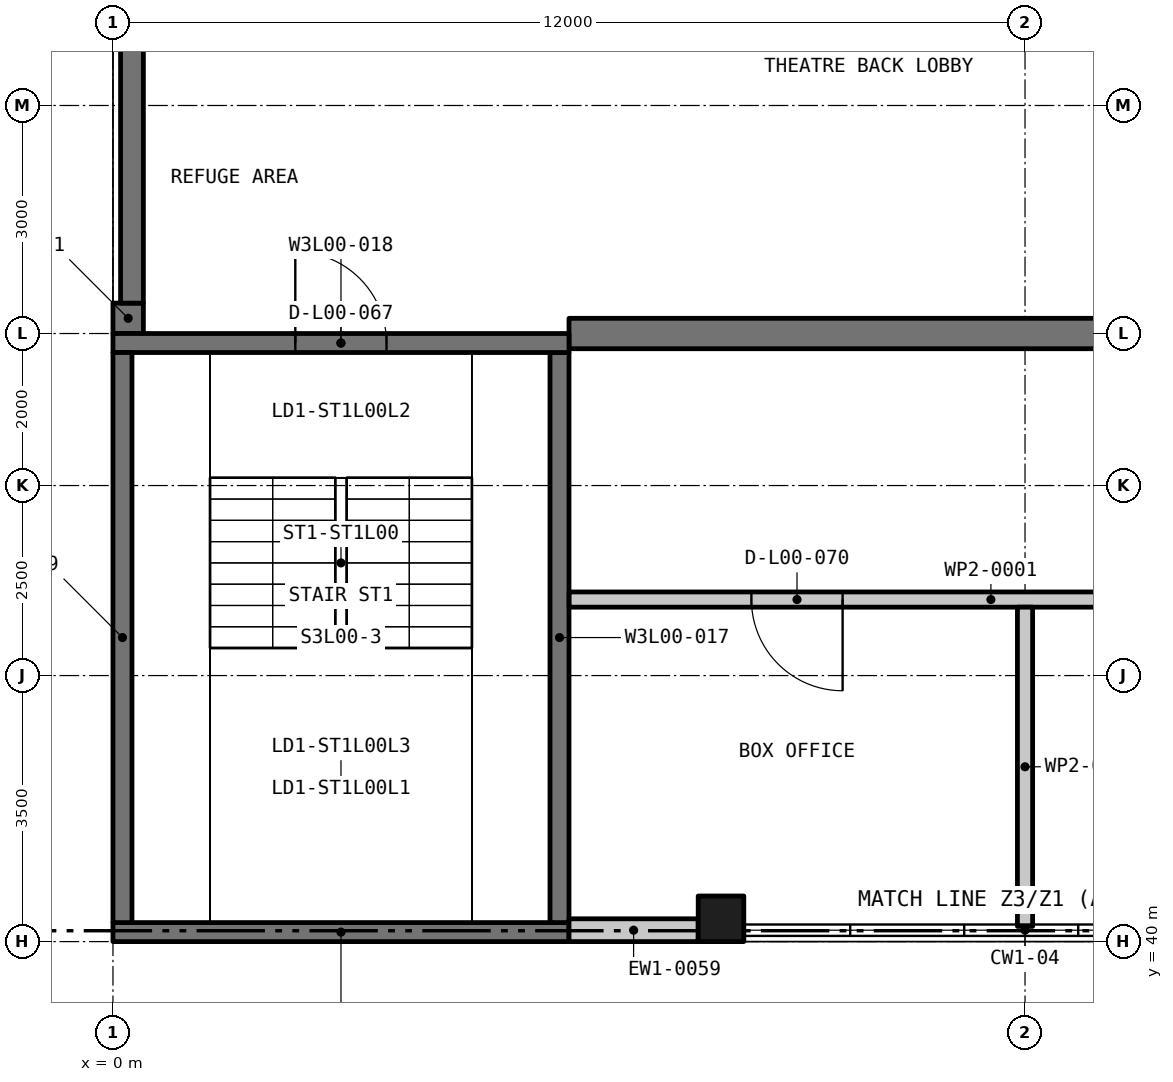
"""IFC4 building model, lengths in metres.
Left out: names, types, materials, properties, quantities, classifications, styles, units other than length and angle.
Written with IfcOpenShell. Run it as: python <this file> out.ifc"""

import sys

from ifc_helpers import new_model, si_unit, direction, frame, frame_2d, origin, origin_2d, place, context, subcontext, project, spatial, rectangle, extrude, element, fill, save


model = new_model("IFC4")
c1 = context("Model", 3, precision=1e-05, world=origin(), true_north=direction((0.0, 1.0)))
c2 = subcontext(c1, "Body", "Model", "MODEL_VIEW")
j1 = project(units=[si_unit("LENGTHUNIT", "METRE"), si_unit("PLANEANGLEUNIT", "RADIAN")], contexts=[c1])
p1 = place(None, origin())
s1 = spatial("IfcSite", under=j1, at=p1, CompositionType="ELEMENT")
p2 = place(p1, origin())
s2 = spatial("IfcBuilding", under=s1, at=p2, CompositionType="ELEMENT")
p3 = place(p2, origin())
s3 = spatial("IfcBuildingStorey", under=s2, at=p3, CompositionType="ELEMENT", Elevation=0.0)
p4 = place(p3, frame((8.0, 40.3, -0.2), z_axis=(0.0, 0.0, 1.0), x_axis=(1.0, 0.0, 0.0)))
e1 = element("IfcColumn", 1, at=p4, inside=s3, PredefinedType="COLUMN", context=c2, shape_type="SweptSolid", body=[
    extrude(rectangle(XDim=0.6, YDim=0.6, at=origin_2d()), origin(), (0.0, 0.0, 1.0), 5.0),
])
p5 = place(p3, frame((0.2, 48.0, -0.2), z_axis=(0.0, 0.0, 1.0), x_axis=(0.0, 1.0, 0.0)))
e2 = element("IfcWall", 2, at=p5, inside=s3, PredefinedType="SOLIDWALL", context=c2, shape_type="SweptSolid", body=[
    extrude(rectangle(XDim=0.4, YDim=0.4, at=frame_2d((0.2, 0.0))), origin(), (0.0, 0.0, 1.0), 5.9),
])
p6 = place(p3, frame((0.25, 48.4, -0.2), z_axis=(0.0, 0.0, 1.0), x_axis=(0.0, 1.0, 0.0)))
e3 = element("IfcWall", 3, at=p6, inside=s3, PredefinedType="SOLIDWALL", context=c2, shape_type="SweptSolid", body=[
    extrude(rectangle(XDim=7.2, YDim=0.3, at=frame_2d((3.6, 0.0))), origin(), (0.0, 0.0, 1.0), 5.9),
])
p7 = place(p3, frame((6.0, 48.0, -0.2), z_axis=(0.0, 0.0, 1.0), x_axis=(1.0, 0.0, 0.0)))
e4 = element("IfcWall", 4, at=p7, inside=s3, PredefinedType="SOLIDWALL", context=c2, shape_type="SweptSolid", body=[
    extrude(rectangle(XDim=17.4, YDim=0.4, at=frame_2d((8.7, 0.0))), origin(), (0.0, 0.0, 1.0), 5.9),
])
p8 = place(p7, frame((7.9, 0.0, 0.2)))
e5 = element("IfcOpeningElement", 5, at=p8, cuts=e4, PredefinedType="OPENING", context=c2, shape_type="SweptSolid", body=[
    extrude(rectangle(XDim=2.0, YDim=2.1, at=frame_2d((1.0, 1.05))), frame((0.0, 0.21, 0.0), z_axis=(0.0, -1.0, 0.0), x_axis=(1.0, 0.0, 0.0)), (0.0, 0.0, 1.0), 0.42),
])
p9 = place(p3, frame((0.0, 40.125, -0.2), z_axis=(0.0, 0.0, 1.0), x_axis=(1.0, 0.0, 0.0)))
e6 = element("IfcWall", 6, at=p9, inside=s3, PredefinedType="SHEAR", context=c2, shape_type="SweptSolid", body=[
    extrude(rectangle(XDim=6.0, YDim=0.25, at=frame_2d((3.0, 0.0))), origin(), (0.0, 0.0, 1.0), 5.9),
])
p10 = place(p3, frame((5.875, 40.25, -0.2), z_axis=(0.0, 0.0, 1.0), x_axis=(0.0, 1.0, 0.0)))
e7 = element("IfcWall", 7, at=p10, inside=s3, PredefinedType="SHEAR", context=c2, shape_type="SweptSolid", body=[
    extrude(rectangle(XDim=7.5, YDim=0.25, at=frame_2d((3.75, 0.0))), origin(), (0.0, 0.0, 1.0), 5.9),
])
p11 = place(p3, frame((0.0, 47.875, -0.2), z_axis=(0.0, 0.0, 1.0), x_axis=(1.0, 0.0, 0.0)))
e8 = element("IfcWall", 8, at=p11, inside=s3, PredefinedType="SHEAR", context=c2, shape_type="SweptSolid", body=[
    extrude(rectangle(XDim=6.0, YDim=0.25, at=frame_2d((3.0, 0.0))), origin(), (0.0, 0.0, 1.0), 5.9),
])
p12 = place(p11, frame((2.399, 0.0, 0.2)))
e9 = element("IfcOpeningElement", 9, at=p12, cuts=e8, PredefinedType="OPENING", context=c2, shape_type="SweptSolid", body=[
    extrude(rectangle(XDim=1.2, YDim=2.2, at=frame_2d((0.6, 1.1))), frame((0.0, 0.135, 0.0), z_axis=(0.0, -1.0, 0.0), x_axis=(1.0, 0.0, 0.0)), (0.0, 0.0, 1.0), 0.27),
])
p13 = place(p3, frame((0.125, 40.25, -0.2), z_axis=(0.0, 0.0, 1.0), x_axis=(0.0, 1.0, 0.0)))
e10 = element("IfcWall", 10, at=p13, inside=s3, PredefinedType="SHEAR", context=c2, shape_type="SweptSolid", body=[
    extrude(rectangle(XDim=7.5, YDim=0.25, at=frame_2d((3.75, 0.0))), origin(), (0.0, 0.0, 1.0), 5.9),
])
p14 = place(p3, frame((7.7, 40.15, 0.0), z_axis=(0.0, 0.0, 1.0), x_axis=(-1.0, 0.0, 0.0)))
e11 = element("IfcWall", 11, at=p14, inside=s3, PredefinedType="SOLIDWALL", context=c2, shape_type="SweptSolid", body=[
    extrude(rectangle(XDim=1.7, YDim=0.3, at=frame_2d((0.85, 0.0))), origin(), (0.0, 0.0, 1.0), 4.8),
])
p15 = place(p3, frame((17.1, 44.5, 0.0), z_axis=(0.0, 0.0, 1.0), x_axis=(-1.0, 0.0, 0.0)))
e12 = element("IfcWall", 12, at=p15, inside=s3, PredefinedType="PARTITIONING", context=c2, shape_type="SweptSolid", body=[
    extrude(rectangle(XDim=11.098, YDim=0.2, at=frame_2d((5.549, 0.0))), origin(), (0.0, 0.0, 1.0), 5.0),
])
p16 = place(p15, frame((7.5, 0.0, 0.0)))
e13 = element("IfcOpeningElement", 13, at=p16, cuts=e12, PredefinedType="OPENING", context=c2, shape_type="SweptSolid", body=[
    extrude(rectangle(XDim=1.2, YDim=2.1, at=frame_2d((0.6, 1.05))), frame((0.0, 0.11, 0.0), z_axis=(0.0, -1.0, 0.0), x_axis=(1.0, 0.0, 0.0)), (0.0, 0.0, 1.0), 0.22),
])
p17 = place(p15, frame((2.0, 0.0, 0.0)))
e14 = element("IfcOpeningElement", 14, at=p17, cuts=e12, PredefinedType="OPENING", context=c2, shape_type="SweptSolid", body=[
    extrude(rectangle(XDim=1.2, YDim=2.1, at=frame_2d((0.6, 1.05))), frame((0.0, 0.11, 0.0), z_axis=(0.0, -1.0, 0.0), x_axis=(1.0, 0.0, 0.0)), (0.0, 0.0, 1.0), 0.22),
])
p18 = place(p3, frame((12.0, 40.2, 0.0), z_axis=(0.0, 0.0, 1.0), x_axis=(0.0, 1.0, 0.0)))
e15 = element("IfcWall", 15, at=p18, inside=s3, PredefinedType="PARTITIONING", context=c2, shape_type="SweptSolid", body=[
    extrude(rectangle(XDim=4.2, YDim=0.2, at=frame_2d((2.1, 0.0))), origin(), (0.0, 0.0, 1.0), 4.8),
])
p19 = place(p12, origin())
e16 = element("IfcDoor", 16, at=p19, inside=s3, OperationType="SINGLE_SWING_LEFT", PredefinedType="DOOR", context=c2, shape_type="SweptSolid", body=[
    extrude(rectangle(XDim=1.2, YDim=2.2, at=frame_2d((0.6, 1.1))), frame((0.0, 0.025, 0.0), z_axis=(0.0, -1.0, 0.0), x_axis=(1.0, 0.0, 0.0)), (0.0, 0.0, 1.0), 0.05),
])
fill(e9, e16)
p20 = place(p16, origin())
e17 = element("IfcDoor", 17, at=p20, inside=s3, OperationType="SINGLE_SWING_LEFT", PredefinedType="DOOR", context=c2, shape_type="SweptSolid", body=[
    extrude(rectangle(XDim=1.2, YDim=2.1, at=frame_2d((0.6, 1.05))), frame((0.0, 0.025, 0.0), z_axis=(0.0, -1.0, 0.0), x_axis=(1.0, 0.0, 0.0)), (0.0, 0.0, 1.0), 0.05),
])
fill(e13, e17)
save(model, sys.argv[1])
